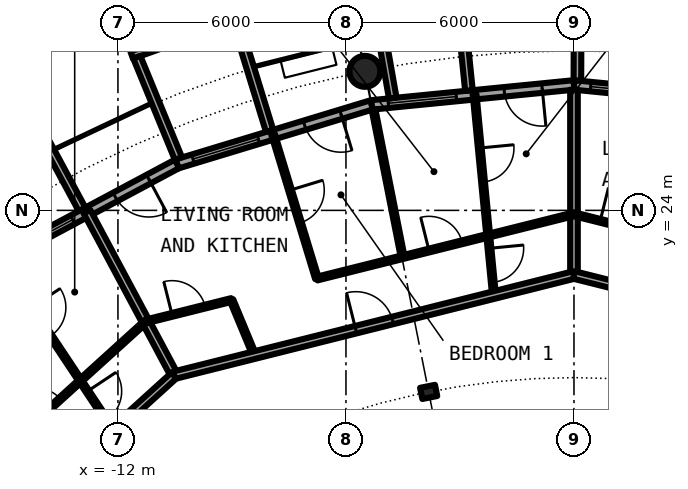
"""IFC4 building model, lengths in metres.
Left out: names, types, materials, properties, quantities, classifications, styles, units other than length and angle.
Written with IfcOpenShell. Run it as: python <this file> out.ifc"""

import sys

from ifc_helpers import new_model, si_unit, direction, frame, frame_2d, origin, origin_2d, place, context, subcontext, project, spatial, rectangle, circle, hollow_circle, i_section, extrude, element, fill, save


model = new_model("IFC4")
c1 = context("Model", 3, precision=1e-05, world=origin(), true_north=direction((0.0, 1.0)))
c2 = subcontext(c1, "Body", "Model", "MODEL_VIEW")
j1 = project(units=[si_unit("LENGTHUNIT", "METRE"), si_unit("PLANEANGLEUNIT", "RADIAN")], contexts=[c1])
p1 = place(None, origin())
s1 = spatial("IfcSite", under=j1, at=p1, CompositionType="ELEMENT")
p2 = place(p1, origin())
s2 = spatial("IfcBuilding", under=s1, at=p2, CompositionType="ELEMENT")
p3 = place(p2, frame((0.0, 0.0, 190.2)))
s3 = spatial("IfcBuildingStorey", under=s2, at=p3, CompositionType="ELEMENT", Elevation=190.2)
p4 = place(p3, frame((-5.501, 27.658, 0.0), z_axis=(0.0, 0.0, 1.0), x_axis=(1.0, 0.0, 0.0)))
e1 = element("IfcColumn", 1, at=p4, inside=s3, PredefinedType="COLUMN", context=c2, shape_type="SweptSolid", body=[
    extrude(hollow_circle(Radius=0.406, WallThickness=0.03, at=origin_2d()), origin(), (0.0, 0.0, 1.0), 3.05),
])
p5 = place(p3, frame((-3.824, 19.223, 0.0), z_axis=(0.0, 0.0, 1.0), x_axis=(-0.195090322016, 0.980785280403, 0.0)))
e2 = element("IfcColumn", 2, at=p5, inside=s3, PredefinedType="COLUMN", context=c2, shape_type="SweptSolid", body=[
    extrude(i_section(OverallWidth=0.3, OverallDepth=0.4, WebThickness=0.013, FlangeThickness=0.024, FilletRadius=0.027, at=origin_2d()), origin(), (0.0, 0.0, 1.0), 3.05),
])
p6 = place(p3, frame((5.326, 26.775, 0.0), z_axis=(0.0, 0.0, 1.0), x_axis=(-0.995173996315, 0.098126026407, 0.0)))
e3 = element("IfcWall", 3, at=p6, inside=s3, PredefinedType="SOLIDWALL", context=c2, shape_type="SweptSolid", body=[
    extrude(rectangle(XDim=5.352, YDim=0.25, at=frame_2d((2.676, 0.0))), origin(), (0.0, 0.0, 1.0), 2.7),
])
p7 = place(p6, frame((0.841, 0.0, 0.0)))
e4 = element("IfcOpeningElement", 4, at=p7, cuts=e3, PredefinedType="OPENING", context=c2, shape_type="SweptSolid", body=[
    extrude(rectangle(XDim=1.0, YDim=2.2, at=frame_2d((0.5, 1.1))), frame((0.0, 0.135, 0.0), z_axis=(0.0, -1.0, 0.0), x_axis=(1.0, 0.0, 0.0)), (0.0, 0.0, 1.0), 0.27),
])
p8 = place(p6, frame((3.111, 0.0, 0.3)))
e5 = element("IfcOpeningElement", 5, at=p8, cuts=e3, PredefinedType="OPENING", context=c2, shape_type="SweptSolid", body=[
    extrude(rectangle(XDim=1.8, YDim=2.1, at=frame_2d((0.9, 1.05))), frame((0.0, 0.135, 0.0), z_axis=(0.0, -1.0, 0.0), x_axis=(1.0, 0.0, 0.0)), (0.0, 0.0, 1.0), 0.27),
])
p9 = place(p3, frame((0.09, 27.417, -0.03), z_axis=(0.0, 0.0, 1.0), x_axis=(0.00347308367, 0.999993968827, 0.0)))
e6 = element("IfcWall", 6, at=p9, inside=s3, PredefinedType="SOLIDWALL", context=c2, shape_type="SweptSolid", body=[
    extrude(rectangle(XDim=2.882, YDim=0.2, at=frame_2d((1.441, 0.0))), origin(), (0.0, 0.0, 1.0), 2.73),
])
p10 = place(p3, frame((0.0, 27.3, 0.0), z_axis=(0.0, 0.0, 1.0), x_axis=(-0.995173996315, -0.098126026407, 0.0)))
e7 = element("IfcWall", 7, at=p10, inside=s3, PredefinedType="SOLIDWALL", context=c2, shape_type="SweptSolid", body=[
    extrude(rectangle(XDim=5.352, YDim=0.25, at=frame_2d((2.676, 0.0))), origin(), (0.0, 0.0, 1.0), 2.7),
])
p11 = place(p10, frame((0.841, 0.0, 0.0)))
e8 = element("IfcOpeningElement", 8, at=p11, cuts=e7, PredefinedType="OPENING", context=c2, shape_type="SweptSolid", body=[
    extrude(rectangle(XDim=1.0, YDim=2.2, at=frame_2d((0.5, 1.1))), frame((0.0, 0.135, 0.0), z_axis=(0.0, -1.0, 0.0), x_axis=(1.0, 0.0, 0.0)), (0.0, 0.0, 1.0), 0.27),
])
p12 = place(p10, frame((3.111, 0.0, 0.3)))
e9 = element("IfcOpeningElement", 9, at=p12, cuts=e7, PredefinedType="OPENING", context=c2, shape_type="SweptSolid", body=[
    extrude(rectangle(XDim=1.8, YDim=2.1, at=frame_2d((0.9, 1.05))), frame((0.0, 0.135, 0.0), z_axis=(0.0, -1.0, 0.0), x_axis=(1.0, 0.0, 0.0)), (0.0, 0.0, 1.0), 0.27),
])
p13 = place(p3, frame((-2.764, 27.153, -0.03), z_axis=(0.0, 0.0, 1.0), x_axis=(-0.101505487237, 0.994834979311, 0.0)))
e10 = element("IfcWall", 10, at=p13, inside=s3, PredefinedType="SOLIDWALL", context=c2, shape_type="SweptSolid", body=[
    extrude(rectangle(XDim=3.007, YDim=0.2, at=frame_2d((1.503, 0.0))), origin(), (0.0, 0.0, 1.0), 2.73),
])
p14 = place(p3, frame((-4.769, 26.956, -0.03), z_axis=(0.0, 0.0, 1.0), x_axis=(-0.174056778901, 0.984735618183, 0.0)))
e11 = element("IfcWall", 11, at=p14, inside=s3, PredefinedType="SOLIDWALL", context=c2, shape_type="SweptSolid", body=[
    extrude(rectangle(XDim=2.925, YDim=0.2, at=frame_2d((1.462, 0.0))), origin(), (0.0, 0.0, 1.0), 2.73),
])
p15 = place(p3, frame((-5.326, 26.775, 0.0), z_axis=(0.0, 0.0, 1.0), x_axis=(-0.956965678721, -0.290201119486, 0.0)))
e12 = element("IfcWall", 12, at=p15, inside=s3, PredefinedType="SOLIDWALL", context=c2, shape_type="SweptSolid", body=[
    extrude(rectangle(XDim=5.351, YDim=0.25, at=frame_2d((2.676, 0.0))), origin(), (0.0, 0.0, 1.0), 2.7),
])
p16 = place(p15, frame((0.841, 0.0, 0.0)))
e13 = element("IfcOpeningElement", 13, at=p16, cuts=e12, PredefinedType="OPENING", context=c2, shape_type="SweptSolid", body=[
    extrude(rectangle(XDim=1.0, YDim=2.2, at=frame_2d((0.5, 1.1))), frame((0.0, 0.135, 0.0), z_axis=(0.0, -1.0, 0.0), x_axis=(1.0, 0.0, 0.0)), (0.0, 0.0, 1.0), 0.27),
])
p17 = place(p15, frame((3.111, 0.0, 0.3)))
e14 = element("IfcOpeningElement", 14, at=p17, cuts=e12, PredefinedType="OPENING", context=c2, shape_type="SweptSolid", body=[
    extrude(rectangle(XDim=1.8, YDim=2.1, at=frame_2d((0.9, 1.05))), frame((0.0, 0.135, 0.0), z_axis=(0.0, -1.0, 0.0), x_axis=(1.0, 0.0, 0.0)), (0.0, 0.0, 1.0), 0.27),
])
p18 = place(p3, frame((-8.82, 29.093, -0.03), z_axis=(0.0, 0.0, 1.0), x_axis=(-0.941461077774, -0.337121697664, 0.0)))
e15 = element("IfcWall", 15, at=p18, inside=s3, PredefinedType="SOLIDWALL", context=c2, shape_type="SweptSolid", body=[
    extrude(rectangle(XDim=2.993, YDim=0.2, at=frame_2d((1.497, 0.0))), origin(), (0.0, 0.0, 1.0), 2.73),
])
p19 = place(p18, frame((0.457, 0.0, 0.33)))
e16 = element("IfcOpeningElement", 16, at=p19, cuts=e15, PredefinedType="OPENING", context=c2, shape_type="SweptSolid", body=[
    extrude(circle(Radius=1.04, at=frame_2d((1.04, 1.04))), frame((0.0, 0.11, 0.0), z_axis=(0.0, -1.0, 0.0), x_axis=(1.0, 0.0, 0.0)), (0.0, 0.0, 1.0), 0.22),
])
p20 = place(p3, frame((-8.009, 26.092, -0.03), z_axis=(0.0, 0.0, 1.0), x_axis=(-0.293406695073, 0.955987715029, 0.0)))
e17 = element("IfcWall", 17, at=p20, inside=s3, PredefinedType="SOLIDWALL", context=c2, shape_type="SweptSolid", body=[
    extrude(rectangle(XDim=3.006, YDim=0.2, at=frame_2d((1.503, 0.0))), origin(), (0.0, 0.0, 1.0), 2.73),
])
p21 = place(p3, frame((-10.409, 25.364, -0.03), z_axis=(0.0, 0.0, 1.0), x_axis=(-0.379509886562, 0.925187681501, 0.0)))
e18 = element("IfcWall", 18, at=p21, inside=s3, PredefinedType="SOLIDWALL", context=c2, shape_type="SweptSolid", body=[
    extrude(rectangle(XDim=2.883, YDim=0.2, at=frame_2d((1.441, 0.0))), origin(), (0.0, 0.0, 1.0), 2.73),
])
p22 = place(p3, frame((-10.447, 25.222, 0.0), z_axis=(0.0, 0.0, 1.0), x_axis=(-0.881915646801, -0.471407246368, 0.0)))
e19 = element("IfcWall", 19, at=p22, inside=s3, PredefinedType="SOLIDWALL", context=c2, shape_type="SweptSolid", body=[
    extrude(rectangle(XDim=5.352, YDim=0.25, at=frame_2d((2.676, 0.0))), origin(), (0.0, 0.0, 1.0), 2.7),
])
p23 = place(p22, frame((0.841, 0.0, 0.0)))
e20 = element("IfcOpeningElement", 20, at=p23, cuts=e19, PredefinedType="OPENING", context=c2, shape_type="SweptSolid", body=[
    extrude(rectangle(XDim=1.0, YDim=2.2, at=frame_2d((0.5, 1.1))), frame((0.0, 0.135, 0.0), z_axis=(0.0, -1.0, 0.0), x_axis=(1.0, 0.0, 0.0)), (0.0, 0.0, 1.0), 0.27),
])
p24 = place(p22, frame((3.111, 0.0, 0.3)))
e21 = element("IfcOpeningElement", 21, at=p24, cuts=e19, PredefinedType="OPENING", context=c2, shape_type="SweptSolid", body=[
    extrude(rectangle(XDim=1.8, YDim=2.1, at=frame_2d((0.9, 1.05))), frame((0.0, 0.135, 0.0), z_axis=(0.0, -1.0, 0.0), x_axis=(1.0, 0.0, 0.0)), (0.0, 0.0, 1.0), 0.27),
])
p25 = place(p3, frame((-12.945, 24.029, -0.03), z_axis=(0.0, 0.0, 1.0), x_axis=(-0.474424310775, 0.88029629861, 0.0)))
e22 = element("IfcWall", 22, at=p25, inside=s3, PredefinedType="SOLIDWALL", context=c2, shape_type="SweptSolid", body=[
    extrude(rectangle(XDim=3.006, YDim=0.2, at=frame_2d((1.503, 0.0))), origin(), (0.0, 0.0, 1.0), 2.73),
])
p26 = place(p3, frame((-9.013, 21.642, 0.0), z_axis=(0.0, 0.0, 1.0), x_axis=(0.384228756538, -0.923237923099, 0.0)))
e23 = element("IfcWall", 23, at=p26, inside=s3, PredefinedType="PARTITIONING", context=c2, shape_type="SweptSolid", body=[
    extrude(rectangle(XDim=1.569, YDim=0.1, at=frame_2d((0.785, 0.0))), origin(), (0.0, 0.0, 1.0), 2.7),
])
p27 = place(p3, frame((-15.054, 22.624, 0.0), z_axis=(0.0, 0.0, 1.0), x_axis=(0.553913391217, -0.832574294, 0.0)))
e24 = element("IfcWall", 24, at=p27, inside=s3, PredefinedType="PARTITIONING", context=c2, shape_type="SweptSolid", body=[
    extrude(rectangle(XDim=5.301, YDim=0.1, at=frame_2d((2.65, 0.0))), origin(), (0.0, 0.0, 1.0), 2.7),
])
p28 = place(p27, frame((4.065, 0.0, 0.0)))
e25 = element("IfcOpeningElement", 25, at=p28, cuts=e24, PredefinedType="OPENING", context=c2, shape_type="SweptSolid", body=[
    extrude(rectangle(XDim=0.9, YDim=2.3, at=frame_2d((0.45, 1.15))), frame((0.0, 0.06, 0.0), z_axis=(0.0, -1.0, 0.0), x_axis=(1.0, 0.0, 0.0)), (0.0, 0.0, 1.0), 0.12),
])
p29 = place(p27, frame((1.415, 0.0, 0.0)))
e26 = element("IfcOpeningElement", 26, at=p29, cuts=e24, PredefinedType="OPENING", context=c2, shape_type="SweptSolid", body=[
    extrude(rectangle(XDim=0.9, YDim=2.3, at=frame_2d((0.45, 1.15))), frame((0.0, 0.06, 0.0), z_axis=(0.0, -1.0, 0.0), x_axis=(1.0, 0.0, 0.0)), (0.0, 0.0, 1.0), 0.12),
])
p30 = place(p3, frame((-12.814, 23.964, 0.0), z_axis=(0.0, 0.0, 1.0), x_axis=(0.471388689095, -0.881925565903, 0.0)))
e27 = element("IfcWall", 27, at=p30, inside=s3, PredefinedType="PARTITIONING", context=c2, shape_type="SweptSolid", body=[
    extrude(rectangle(XDim=4.875, YDim=0.2, at=frame_2d((2.438, 0.0))), origin(), (0.0, 0.0, 1.0), 2.7),
])
p31 = place(p3, frame((-7.917, 25.996, 0.0), z_axis=(0.0, 0.0, 1.0), x_axis=(0.291291575636, -0.956634317785, 0.0)))
e28 = element("IfcWall", 28, at=p31, inside=s3, PredefinedType="PARTITIONING", context=c2, shape_type="SweptSolid", body=[
    extrude(rectangle(XDim=3.962, YDim=0.1, at=frame_2d((1.981, 0.0))), origin(), (0.0, 0.0, 1.0), 2.7),
])
p32 = place(p31, frame((1.531, 0.0, 0.0)))
e29 = element("IfcOpeningElement", 29, at=p32, cuts=e28, PredefinedType="OPENING", context=c2, shape_type="SweptSolid", body=[
    extrude(rectangle(XDim=0.9, YDim=2.3, at=frame_2d((0.45, 1.15))), frame((0.0, 0.06, 0.0), z_axis=(0.0, -1.0, 0.0), x_axis=(1.0, 0.0, 0.0)), (0.0, 0.0, 1.0), 0.12),
])
p33 = place(p3, frame((-5.276, 26.658, 0.0), z_axis=(0.0, 0.0, 1.0), x_axis=(0.194030211642, -0.980995554001, 0.0)))
e30 = element("IfcWall", 30, at=p33, inside=s3, PredefinedType="PARTITIONING", context=c2, shape_type="SweptSolid", body=[
    extrude(rectangle(XDim=3.962, YDim=0.1, at=frame_2d((1.981, 0.0))), origin(), (0.0, 0.0, 1.0), 2.7),
])
p34 = place(p3, frame((-2.615, 27.049, 0.0), z_axis=(0.0, 0.0, 1.0), x_axis=(0.096215269366, -0.995360548716, 0.0)))
e31 = element("IfcWall", 31, at=p34, inside=s3, PredefinedType="PARTITIONING", context=c2, shape_type="SweptSolid", body=[
    extrude(rectangle(XDim=5.301, YDim=0.1, at=frame_2d((2.65, 0.0))), origin(), (0.0, 0.0, 1.0), 2.7),
])
p35 = place(p34, frame((4.066, 0.0, 0.0)))
e32 = element("IfcOpeningElement", 32, at=p35, cuts=e31, PredefinedType="OPENING", context=c2, shape_type="SweptSolid", body=[
    extrude(rectangle(XDim=0.9, YDim=2.3, at=frame_2d((0.45, 1.15))), frame((0.0, 0.06, 0.0), z_axis=(0.0, -1.0, 0.0), x_axis=(1.0, 0.0, 0.0)), (0.0, 0.0, 1.0), 0.12),
])
p36 = place(p34, frame((1.415, 0.0, 0.0)))
e33 = element("IfcOpeningElement", 33, at=p36, cuts=e31, PredefinedType="OPENING", context=c2, shape_type="SweptSolid", body=[
    extrude(rectangle(XDim=0.9, YDim=2.3, at=frame_2d((0.45, 1.15))), frame((0.0, 0.06, 0.0), z_axis=(0.0, -1.0, 0.0), x_axis=(1.0, 0.0, 0.0)), (0.0, 0.0, 1.0), 0.12),
])
p37 = place(p3, frame((0.0, 22.3, 0.0), z_axis=(0.0, 0.0, 1.0), x_axis=(0.0, 1.0, 0.0)))
e34 = element("IfcWall", 34, at=p37, inside=s3, PredefinedType="PARTITIONING", context=c2, shape_type="SweptSolid", body=[
    extrude(rectangle(XDim=4.875, YDim=0.2, at=frame_2d((2.438, 0.0))), origin(), (0.0, 0.0, 1.0), 2.7),
])
p38 = place(p3, frame((-18.543, 12.386, 0.0), z_axis=(0.0, 0.0, 1.0), x_axis=(0.740853508928, 0.671666642248, 0.0)))
e35 = element("IfcWall", 35, at=p38, inside=s3, PredefinedType="PARTITIONING", context=c2, shape_type="SweptSolid", body=[
    extrude(rectangle(XDim=10.84, YDim=0.2, at=frame_2d((5.42, 0.0))), origin(), (0.0, 0.0, 1.0), 2.7),
])
p39 = place(p38, frame((4.921, 0.0, 0.0)))
e36 = element("IfcOpeningElement", 36, at=p39, cuts=e35, PredefinedType="OPENING", context=c2, shape_type="SweptSolid", body=[
    extrude(rectangle(XDim=1.0, YDim=2.3, at=frame_2d((0.5, 1.15))), frame((0.0, 0.11, 0.0), z_axis=(0.0, -1.0, 0.0), x_axis=(1.0, 0.0, 0.0)), (0.0, 0.0, 1.0), 0.22),
])
p40 = place(p3, frame((-10.521, 19.662, 0.0), z_axis=(0.0, 0.0, 1.0), x_axis=(0.969975443945, 0.243202874456, 0.0)))
e37 = element("IfcWall", 37, at=p40, inside=s3, PredefinedType="PARTITIONING", context=c2, shape_type="SweptSolid", body=[
    extrude(rectangle(XDim=10.847, YDim=0.2, at=frame_2d((5.423, 0.0))), origin(), (0.0, 0.0, 1.0), 2.7),
])
p41 = place(p40, frame((4.928, 0.0, 0.0)))
e38 = element("IfcOpeningElement", 38, at=p41, cuts=e37, PredefinedType="OPENING", context=c2, shape_type="SweptSolid", body=[
    extrude(rectangle(XDim=1.0, YDim=2.3, at=frame_2d((0.5, 1.15))), frame((0.0, 0.11, 0.0), z_axis=(0.0, -1.0, 0.0), x_axis=(1.0, 0.0, 0.0)), (0.0, 0.0, 1.0), 0.22),
])
p42 = place(p3, frame((0.0, 22.3, 0.0), z_axis=(0.0, 0.0, 1.0), x_axis=(0.969975443945, -0.243202874456, 0.0)))
e39 = element("IfcWall", 39, at=p42, inside=s3, PredefinedType="PARTITIONING", context=c2, shape_type="SweptSolid", body=[
    extrude(rectangle(XDim=10.847, YDim=0.2, at=frame_2d((5.423, 0.0))), origin(), (0.0, 0.0, 1.0), 2.7),
])
p43 = place(p42, frame((4.918, 0.0, 0.0)))
e40 = element("IfcOpeningElement", 40, at=p43, cuts=e39, PredefinedType="OPENING", context=c2, shape_type="SweptSolid", body=[
    extrude(rectangle(XDim=1.0, YDim=2.3, at=frame_2d((0.5, 1.15))), frame((0.0, 0.11, 0.0), z_axis=(0.0, -1.0, 0.0), x_axis=(1.0, 0.0, 0.0)), (0.0, 0.0, 1.0), 0.22),
])
p44 = place(p3, frame((-16.43, 16.398, 0.0), z_axis=(0.0, 0.0, 1.0), x_axis=(0.740934061958, 0.671577780923, 0.0)))
e41 = element("IfcWall", 41, at=p44, inside=s3, PredefinedType="PARTITIONING", context=c2, shape_type="SweptSolid", body=[
    extrude(rectangle(XDim=6.963, YDim=0.1, at=frame_2d((3.481, 0.0))), origin(), (0.0, 0.0, 1.0), 2.7),
])
p45 = place(p44, frame((3.034, 0.0, 0.0)))
e42 = element("IfcOpeningElement", 42, at=p45, cuts=e41, PredefinedType="OPENING", context=c2, shape_type="SweptSolid", body=[
    extrude(rectangle(XDim=0.9, YDim=2.3, at=frame_2d((0.45, 1.15))), frame((0.0, 0.06, 0.0), z_axis=(0.0, -1.0, 0.0), x_axis=(1.0, 0.0, 0.0)), (0.0, 0.0, 1.0), 0.12),
])
p46 = place(p3, frame((-11.266, 21.078, 0.0), z_axis=(0.0, 0.0, 1.0), x_axis=(0.970074478144, 0.242807551066, 0.0)))
e43 = element("IfcWall", 43, at=p46, inside=s3, PredefinedType="PARTITIONING", context=c2, shape_type="SweptSolid", body=[
    extrude(rectangle(XDim=2.324, YDim=0.1, at=frame_2d((1.162, 0.0))), origin(), (0.0, 0.0, 1.0), 2.7),
])
p47 = place(p46, frame((0.712, 0.0, 0.0)))
e44 = element("IfcOpeningElement", 44, at=p47, cuts=e43, PredefinedType="OPENING", context=c2, shape_type="SweptSolid", body=[
    extrude(rectangle(XDim=0.9, YDim=2.3, at=frame_2d((0.45, 1.15))), frame((0.0, 0.06, 0.0), z_axis=(0.0, -1.0, 0.0), x_axis=(1.0, 0.0, 0.0)), (0.0, 0.0, 1.0), 0.12),
])
p48 = place(p3, frame((-6.76, 22.206, 0.0), z_axis=(0.0, 0.0, 1.0), x_axis=(0.9700785795, 0.242791164576, 0.0)))
e45 = element("IfcWall", 45, at=p48, inside=s3, PredefinedType="PARTITIONING", context=c2, shape_type="SweptSolid", body=[
    extrude(rectangle(XDim=6.969, YDim=0.1, at=frame_2d((3.484, 0.0))), origin(), (0.0, 0.0, 1.0), 2.7),
])
p49 = place(p48, frame((3.036, 0.0, 0.0)))
e46 = element("IfcOpeningElement", 46, at=p49, cuts=e45, PredefinedType="OPENING", context=c2, shape_type="SweptSolid", body=[
    extrude(rectangle(XDim=0.9, YDim=2.3, at=frame_2d((0.45, 1.15))), frame((0.0, 0.06, 0.0), z_axis=(0.0, -1.0, 0.0), x_axis=(1.0, 0.0, 0.0)), (0.0, 0.0, 1.0), 0.12),
])
p50 = place(p3, frame((0.0, 23.898, 0.0), z_axis=(0.0, 0.0, 1.0), x_axis=(0.970068250789, -0.242832429489, 0.0)))
e47 = element("IfcWall", 47, at=p50, inside=s3, PredefinedType="PARTITIONING", context=c2, shape_type="SweptSolid", body=[
    extrude(rectangle(XDim=2.323, YDim=0.1, at=frame_2d((1.161, 0.0))), origin(), (0.0, 0.0, 1.0), 2.7),
])
p51 = place(p50, frame((0.711, 0.0, 0.0)))
e48 = element("IfcOpeningElement", 48, at=p51, cuts=e47, PredefinedType="OPENING", context=c2, shape_type="SweptSolid", body=[
    extrude(rectangle(XDim=0.9, YDim=2.3, at=frame_2d((0.45, 1.15))), frame((0.0, 0.06, 0.0), z_axis=(0.0, -1.0, 0.0), x_axis=(1.0, 0.0, 0.0)), (0.0, 0.0, 1.0), 0.12),
])
p52 = place(p8, origin())
e49 = element("IfcWindow", 49, at=p52, inside=s3, PartitioningType="SINGLE_PANEL", PredefinedType="WINDOW", context=c2, shape_type="SweptSolid", body=[
    extrude(rectangle(XDim=1.8, YDim=2.1, at=frame_2d((0.9, 1.05))), frame((0.0, 0.03, 0.0), z_axis=(0.0, -1.0, 0.0), x_axis=(1.0, 0.0, 0.0)), (0.0, 0.0, 1.0), 0.06),
])
fill(e5, e49)
p53 = place(p11, origin())
e50 = element("IfcDoor", 50, at=p53, inside=s3, OperationType="SINGLE_SWING_LEFT", PredefinedType="DOOR", context=c2, shape_type="SweptSolid", body=[
    extrude(rectangle(XDim=1.0, YDim=2.2, at=frame_2d((0.5, 1.1))), frame((0.0, 0.025, 0.0), z_axis=(0.0, -1.0, 0.0), x_axis=(1.0, 0.0, 0.0)), (0.0, 0.0, 1.0), 0.05),
])
fill(e8, e50)
p54 = place(p12, origin())
e51 = element("IfcWindow", 51, at=p54, inside=s3, PartitioningType="SINGLE_PANEL", PredefinedType="WINDOW", context=c2, shape_type="SweptSolid", body=[
    extrude(rectangle(XDim=1.8, YDim=2.1, at=frame_2d((0.9, 1.05))), frame((0.0, 0.03, 0.0), z_axis=(0.0, -1.0, 0.0), x_axis=(1.0, 0.0, 0.0)), (0.0, 0.0, 1.0), 0.06),
])
fill(e9, e51)
p55 = place(p16, origin())
e52 = element("IfcDoor", 52, at=p55, inside=s3, OperationType="SINGLE_SWING_LEFT", PredefinedType="DOOR", context=c2, shape_type="SweptSolid", body=[
    extrude(rectangle(XDim=1.0, YDim=2.2, at=frame_2d((0.5, 1.1))), frame((0.0, 0.025, 0.0), z_axis=(0.0, -1.0, 0.0), x_axis=(1.0, 0.0, 0.0)), (0.0, 0.0, 1.0), 0.05),
])
fill(e13, e52)
p56 = place(p17, origin())
e53 = element("IfcWindow", 53, at=p56, inside=s3, PartitioningType="SINGLE_PANEL", PredefinedType="WINDOW", context=c2, shape_type="SweptSolid", body=[
    extrude(rectangle(XDim=1.8, YDim=2.1, at=frame_2d((0.9, 1.05))), frame((0.0, 0.03, 0.0), z_axis=(0.0, -1.0, 0.0), x_axis=(1.0, 0.0, 0.0)), (0.0, 0.0, 1.0), 0.06),
])
fill(e14, e53)
p57 = place(p23, origin())
e54 = element("IfcDoor", 54, at=p57, inside=s3, OperationType="SINGLE_SWING_LEFT", PredefinedType="DOOR", context=c2, shape_type="SweptSolid", body=[
    extrude(rectangle(XDim=1.0, YDim=2.2, at=frame_2d((0.5, 1.1))), frame((0.0, 0.025, 0.0), z_axis=(0.0, -1.0, 0.0), x_axis=(1.0, 0.0, 0.0)), (0.0, 0.0, 1.0), 0.05),
])
fill(e20, e54)
p58 = place(p24, origin())
e55 = element("IfcWindow", 55, at=p58, inside=s3, PartitioningType="SINGLE_PANEL", PredefinedType="WINDOW", context=c2, shape_type="SweptSolid", body=[
    extrude(rectangle(XDim=1.8, YDim=2.1, at=frame_2d((0.9, 1.05))), frame((0.0, 0.03, 0.0), z_axis=(0.0, -1.0, 0.0), x_axis=(1.0, 0.0, 0.0)), (0.0, 0.0, 1.0), 0.06),
])
fill(e21, e55)
p59 = place(p51, origin())
e56 = element("IfcDoor", 56, at=p59, inside=s3, OperationType="SINGLE_SWING_LEFT", PredefinedType="DOOR", context=c2, shape_type="SweptSolid", body=[
    extrude(rectangle(XDim=0.9, YDim=2.3, at=frame_2d((0.45, 1.15))), frame((0.0, 0.025, 0.0), z_axis=(0.0, -1.0, 0.0), x_axis=(1.0, 0.0, 0.0)), (0.0, 0.0, 1.0), 0.05),
])
fill(e48, e56)
p60 = place(p41, origin())
e57 = element("IfcDoor", 57, at=p60, inside=s3, OperationType="SINGLE_SWING_RIGHT", PredefinedType="DOOR", context=c2, shape_type="SweptSolid", body=[
    extrude(rectangle(XDim=1.0, YDim=2.3, at=frame_2d((0.5, 1.15))), frame((0.0, 0.025, 0.0), z_axis=(0.0, -1.0, 0.0), x_axis=(1.0, 0.0, 0.0)), (0.0, 0.0, 1.0), 0.05),
])
fill(e38, e57)
p61 = place(p47, origin())
e58 = element("IfcDoor", 58, at=p61, inside=s3, OperationType="SINGLE_SWING_LEFT", PredefinedType="DOOR", context=c2, shape_type="SweptSolid", body=[
    extrude(rectangle(XDim=0.9, YDim=2.3, at=frame_2d((0.45, 1.15))), frame((0.0, 0.025, 0.0), z_axis=(0.0, -1.0, 0.0), x_axis=(1.0, 0.0, 0.0)), (0.0, 0.0, 1.0), 0.05),
])
fill(e44, e58)
p62 = place(p35, origin())
e59 = element("IfcDoor", 59, at=p62, inside=s3, OperationType="SINGLE_SWING_RIGHT", PredefinedType="DOOR", context=c2, shape_type="SweptSolid", body=[
    extrude(rectangle(XDim=0.9, YDim=2.3, at=frame_2d((0.45, 1.15))), frame((0.0, 0.025, 0.0), z_axis=(0.0, -1.0, 0.0), x_axis=(1.0, 0.0, 0.0)), (0.0, 0.0, 1.0), 0.05),
])
fill(e32, e59)
p63 = place(p32, origin())
e60 = element("IfcDoor", 60, at=p63, inside=s3, OperationType="SINGLE_SWING_LEFT", PredefinedType="DOOR", context=c2, shape_type="SweptSolid", body=[
    extrude(rectangle(XDim=0.9, YDim=2.3, at=frame_2d((0.45, 1.15))), frame((0.0, 0.025, 0.0), z_axis=(0.0, -1.0, 0.0), x_axis=(1.0, 0.0, 0.0)), (0.0, 0.0, 1.0), 0.05),
])
fill(e29, e60)
p64 = place(p49, origin())
e61 = element("IfcDoor", 61, at=p64, inside=s3, OperationType="SINGLE_SWING_RIGHT", PredefinedType="DOOR", context=c2, shape_type="SweptSolid", body=[
    extrude(rectangle(XDim=0.9, YDim=2.3, at=frame_2d((0.45, 1.15))), frame((0.0, 0.025, 0.0), z_axis=(0.0, -1.0, 0.0), x_axis=(1.0, 0.0, 0.0)), (0.0, 0.0, 1.0), 0.05),
])
fill(e46, e61)
p65 = place(p36, origin())
e62 = element("IfcDoor", 62, at=p65, inside=s3, OperationType="SINGLE_SWING_LEFT", PredefinedType="DOOR", context=c2, shape_type="SweptSolid", body=[
    extrude(rectangle(XDim=0.9, YDim=2.3, at=frame_2d((0.45, 1.15))), frame((0.0, 0.025, 0.0), z_axis=(0.0, -1.0, 0.0), x_axis=(1.0, 0.0, 0.0)), (0.0, 0.0, 1.0), 0.05),
])
fill(e33, e62)
p66 = place(p28, origin())
e63 = element("IfcDoor", 63, at=p66, inside=s3, OperationType="SINGLE_SWING_RIGHT", PredefinedType="DOOR", context=c2, shape_type="SweptSolid", body=[
    extrude(rectangle(XDim=0.9, YDim=2.3, at=frame_2d((0.45, 1.15))), frame((0.0, 0.025, 0.0), z_axis=(0.0, -1.0, 0.0), x_axis=(1.0, 0.0, 0.0)), (0.0, 0.0, 1.0), 0.05),
])
fill(e25, e63)
p67 = place(p45, origin())
e64 = element("IfcDoor", 64, at=p67, inside=s3, OperationType="SINGLE_SWING_RIGHT", PredefinedType="DOOR", context=c2, shape_type="SweptSolid", body=[
    extrude(rectangle(XDim=0.9, YDim=2.3, at=frame_2d((0.45, 1.15))), frame((0.0, 0.025, 0.0), z_axis=(0.0, -1.0, 0.0), x_axis=(1.0, 0.0, 0.0)), (0.0, 0.0, 1.0), 0.05),
])
fill(e42, e64)
save(model, sys.argv[1])
